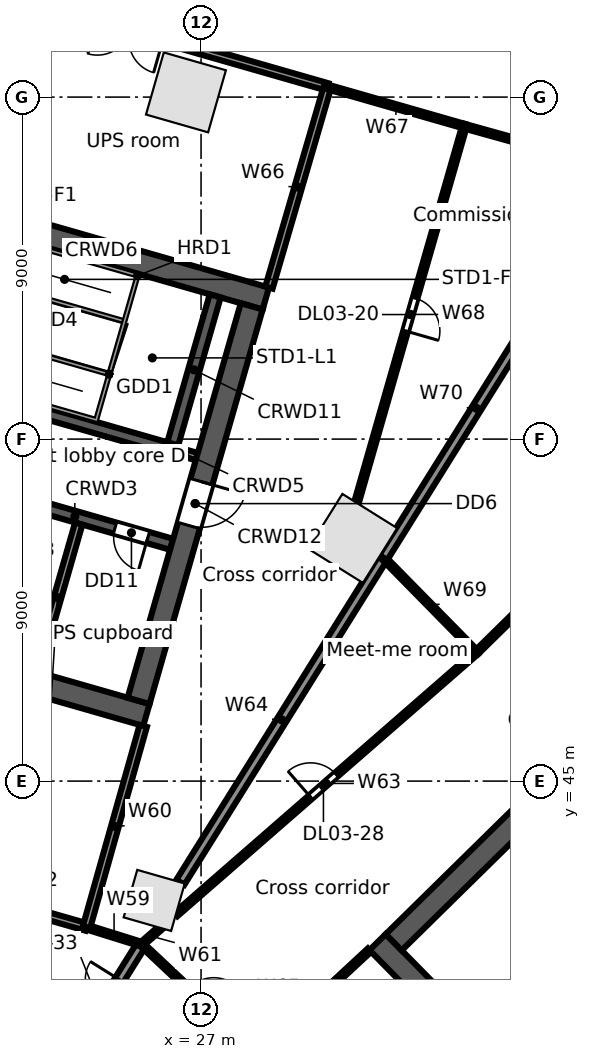
"""IFC4 building model, lengths in metres.
Left out: names, types, materials, properties, quantities, classifications, styles, units other than length and angle.
Written with IfcOpenShell. Run it as: python <this file> out.ifc"""

import sys

from ifc_helpers import new_model, si_unit, direction, frame, frame_2d, origin, origin_2d, place, context, subcontext, project, spatial, rectangle, extrude, element, fill, save


model = new_model("IFC4")
c1 = context("Model", 3, precision=1e-05, world=origin(), true_north=direction((0.0, 1.0)))
c2 = subcontext(c1, "Body", "Model", "MODEL_VIEW")
j1 = project(units=[si_unit("LENGTHUNIT", "METRE"), si_unit("PLANEANGLEUNIT", "RADIAN")], contexts=[c1])
p1 = place(None, origin())
s1 = spatial("IfcSite", under=j1, at=p1, CompositionType="ELEMENT")
p2 = place(p1, origin())
s2 = spatial("IfcBuilding", under=s1, at=p2, CompositionType="ELEMENT")
p3 = place(p2, frame((0.0, 0.0, 16.5)))
s3 = spatial("IfcBuildingStorey", under=s2, at=p3, CompositionType="ELEMENT", Elevation=16.5)
p4 = place(p3, frame((26.603, 63.124, 0.0), z_axis=(0.0, 0.0, 1.0), x_axis=(-0.961261695938, 0.275637355817, 0.0)))
e1 = element("IfcColumn", 1, at=p4, inside=s3, PredefinedType="COLUMN", context=c2, shape_type="SweptSolid", body=[
    extrude(rectangle(XDim=1.7, YDim=1.7, at=origin_2d()), origin(), (0.0, 0.0, 1.0), 5.0),
])
p5 = place(p3, frame((25.767, 41.86, 0.0), z_axis=(0.0, 0.0, 1.0), x_axis=(0.961261695938, -0.275637355817, 0.0)))
e2 = element("IfcColumn", 2, at=p5, inside=s3, PredefinedType="COLUMN", context=c2, shape_type="SweptSolid", body=[
    extrude(rectangle(XDim=1.3, YDim=1.3, at=origin_2d()), origin(), (0.0, 0.0, 1.0), 5.0),
])
p6 = place(p3, frame((30.99, 51.386, 0.0), z_axis=(0.0, 0.0, 1.0), x_axis=(0.529919264233, 0.848048096156, 0.0)))
e3 = element("IfcColumn", 3, at=p6, inside=s3, PredefinedType="COLUMN", context=c2, shape_type="SweptSolid", body=[
    extrude(rectangle(XDim=1.7, YDim=1.7, at=origin_2d()), origin(), (0.0, 0.0, 1.0), 5.0),
])
p7 = place(p3, frame((31.646, 40.763, 0.0), z_axis=(0.0, 0.0, 1.0), x_axis=(0.700911255944, -0.713248491965, 0.0)))
e4 = element("IfcWall", 4, at=p7, inside=s3, PredefinedType="SOLIDWALL", context=c2, shape_type="SweptSolid", body=[
    extrude(rectangle(XDim=15.0, YDim=0.6, at=frame_2d((7.5, 0.0))), origin(), (0.0, 0.0, 1.0), 4.65),
])
p8 = place(p7, frame((12.9, 0.0, 0.0)))
e5 = element("IfcOpeningElement", 5, at=p8, cuts=e4, PredefinedType="OPENING", context=c2, shape_type="SweptSolid", body=[
    extrude(rectangle(XDim=1.2, YDim=2.1, at=frame_2d((0.6, 1.05))), frame((0.0, 0.31, 0.0), z_axis=(0.0, -1.0, 0.0), x_axis=(1.0, 0.0, 0.0)), (0.0, 0.0, 1.0), 0.62),
])
p9 = place(p3, frame((32.07, 40.759, 0.0), z_axis=(0.0, 0.0, 1.0), x_axis=(0.713245344712, 0.70091445858, 0.0)))
e6 = element("IfcWall", 6, at=p9, inside=s3, PredefinedType="SOLIDWALL", context=c2, shape_type="SweptSolid", body=[
    extrude(rectangle(XDim=13.8, YDim=0.6, at=frame_2d((6.9, 0.0))), origin(), (0.0, 0.0, 1.0), 4.65),
])
p10 = place(p3, frame((34.593, 38.191, 0.0), z_axis=(0.0, 0.0, 1.0), x_axis=(0.713252216116, 0.700907466222, 0.0)))
e7 = element("IfcWall", 7, at=p10, inside=s3, PredefinedType="SOLIDWALL", context=c2, shape_type="SweptSolid", body=[
    extrude(rectangle(XDim=4.45, YDim=0.2, at=frame_2d((2.225, 0.0))), origin(), (0.0, 0.0, 1.0), 4.65),
])
p11 = place(p3, frame((16.911, 49.221, 0.0), z_axis=(0.0, 0.0, 1.0), x_axis=(0.96126248289, -0.275634611374, 0.0)))
e8 = element("IfcWall", 8, at=p11, inside=s3, PredefinedType="SOLIDWALL", context=c2, shape_type="SweptSolid", body=[
    extrude(rectangle(XDim=9.0, YDim=0.6, at=frame_2d((4.5, 0.0))), origin(), (0.0, 0.0, 1.0), 4.65),
])
p12 = place(p3, frame((21.131, 52.692, 0.0), z_axis=(0.0, 0.0, 1.0), x_axis=(0.961271492568, -0.275603188616, 0.0)))
e9 = element("IfcWall", 9, at=p12, inside=s3, PredefinedType="SOLIDWALL", context=c2, shape_type="SweptSolid", body=[
    extrude(rectangle(XDim=5.3, YDim=0.3, at=frame_2d((2.65, 0.0))), origin(), (0.0, 0.0, 1.0), 4.65),
])
p13 = place(p12, frame((0.95, 0.0, 0.0)))
e10 = element("IfcOpeningElement", 10, at=p13, cuts=e9, PredefinedType="OPENING", context=c2, shape_type="SweptSolid", body=[
    extrude(rectangle(XDim=0.9, YDim=2.1, at=frame_2d((0.45, 1.05))), frame((0.0, 0.16, 0.0), z_axis=(0.0, -1.0, 0.0), x_axis=(1.0, 0.0, 0.0)), (0.0, 0.0, 1.0), 0.32),
])
p14 = place(p12, frame((3.75, 0.0, 0.0)))
e11 = element("IfcOpeningElement", 11, at=p14, cuts=e9, PredefinedType="OPENING", context=c2, shape_type="SweptSolid", body=[
    extrude(rectangle(XDim=0.9, YDim=2.1, at=frame_2d((0.45, 1.05))), frame((0.0, 0.16, 0.0), z_axis=(0.0, -1.0, 0.0), x_axis=(1.0, 0.0, 0.0)), (0.0, 0.0, 1.0), 0.32),
])
p15 = place(p3, frame((19.389, 55.689, 0.0), z_axis=(0.0, 0.0, 1.0), x_axis=(0.961261397636, -0.275638396117, 0.0)))
e12 = element("IfcWall", 12, at=p15, inside=s3, PredefinedType="SOLIDWALL", context=c2, shape_type="SweptSolid", body=[
    extrude(rectangle(XDim=7.1, YDim=0.3, at=frame_2d((3.55, 0.0))), origin(), (0.0, 0.0, 1.0), 4.65),
])
p16 = place(p15, frame((0.2, 0.0, 0.0)))
e13 = element("IfcOpeningElement", 13, at=p16, cuts=e12, PredefinedType="OPENING", context=c2, shape_type="SweptSolid", body=[
    extrude(rectangle(XDim=1.0, YDim=2.1, at=frame_2d((0.5, 1.05))), frame((0.0, 0.16, 0.0), z_axis=(0.0, -1.0, 0.0), x_axis=(1.0, 0.0, 0.0)), (0.0, 0.0, 1.0), 0.32),
])
p17 = place(p3, frame((26.214, 53.732, 0.0), z_axis=(0.0, 0.0, 1.0), x_axis=(0.96122076476, -0.27578005982, 0.0)))
e14 = element("IfcWall", 14, at=p17, inside=s3, PredefinedType="SOLIDWALL", context=c2, shape_type="SweptSolid", body=[
    extrude(rectangle(XDim=0.7, YDim=0.2, at=frame_2d((0.35, 0.0))), origin(), (0.0, 0.0, 1.0), 4.65),
])
p18 = place(p3, frame((20.053, 60.18, 0.0), z_axis=(0.0, 0.0, 1.0), x_axis=(0.96126248289, -0.275634611374, 0.0)))
e15 = element("IfcWall", 15, at=p18, inside=s3, PredefinedType="SOLIDWALL", context=c2, shape_type="SweptSolid", body=[
    extrude(rectangle(XDim=9.0, YDim=0.6, at=frame_2d((4.5, 0.0))), origin(), (0.0, 0.0, 1.0), 4.65),
])
p19 = place(p3, frame((22.665, 47.883, 0.0), z_axis=(0.0, 0.0, 1.0), x_axis=(0.275596769212, 0.961273333033, 0.0)))
e16 = element("IfcWall", 16, at=p19, inside=s3, PredefinedType="PARTITIONING", context=c2, shape_type="SweptSolid", body=[
    extrude(rectangle(XDim=4.05, YDim=0.2, at=frame_2d((2.025, 0.0))), origin(), (0.0, 0.0, 1.0), 4.65),
])
p20 = place(p3, frame((26.256, 53.876, 0.0), z_axis=(0.0, 0.0, 1.0), x_axis=(0.275612739511, 0.961268754209, 0.0)))
e17 = element("IfcWall", 17, at=p20, inside=s3, PredefinedType="SOLIDWALL", context=c2, shape_type="SweptSolid", body=[
    extrude(rectangle(XDim=4.05, YDim=0.3, at=frame_2d((2.025, 0.0))), origin(), (0.0, 0.0, 1.0), 4.65),
])
p21 = place(p3, frame((25.356, 47.112, 0.0), z_axis=(0.0, 0.0, 1.0), x_axis=(0.275631631629, 0.961263337304, 0.0)))
e18 = element("IfcWall", 18, at=p21, inside=s3, PredefinedType="SOLIDWALL", context=c2, shape_type="SweptSolid", body=[
    extrude(rectangle(XDim=10.8, YDim=0.6, at=frame_2d((5.4, 0.0))), origin(), (0.0, 0.0, 1.0), 4.65),
])
p22 = place(p21, frame((4.8, 0.0, 0.0)))
e19 = element("IfcOpeningElement", 19, at=p22, cuts=e18, PredefinedType="OPENING", context=c2, shape_type="SweptSolid", body=[
    extrude(rectangle(XDim=1.2, YDim=2.1, at=frame_2d((0.6, 1.05))), frame((0.0, 0.31, 0.0), z_axis=(0.0, -1.0, 0.0), x_axis=(1.0, 0.0, 0.0)), (0.0, 0.0, 1.0), 0.62),
])
p23 = place(p3, frame((15.335, 43.639, 0.0), z_axis=(0.0, 0.0, 1.0), x_axis=(0.961281982754, -0.275566597455, 0.0)))
e20 = element("IfcWall", 20, at=p23, inside=s3, PredefinedType="PARTITIONING", context=c2, shape_type="SweptSolid", body=[
    extrude(rectangle(XDim=9.0, YDim=0.2, at=frame_2d((4.5, 0.0))), origin(), (0.0, 0.0, 1.0), 3.822),
])
p24 = place(p23, frame((3.7, 0.0, 0.0)))
e21 = element("IfcOpeningElement", 21, at=p24, cuts=e20, PredefinedType="OPENING", context=c2, shape_type="SweptSolid", body=[
    extrude(rectangle(XDim=1.8, YDim=2.1, at=frame_2d((0.9, 1.05))), frame((0.0, 0.11, 0.0), z_axis=(0.0, -1.0, 0.0), x_axis=(1.0, 0.0, 0.0)), (0.0, 0.0, 1.0), 0.22),
])
p25 = place(p3, frame((21.674, 65.749, 0.0), z_axis=(0.0, 0.0, 1.0), x_axis=(0.961259417468, -0.275645301662, 0.0)))
e22 = element("IfcWall", 22, at=p25, inside=s3, PredefinedType="PARTITIONING", context=c2, shape_type="SweptSolid", body=[
    extrude(rectangle(XDim=9.0, YDim=0.2, at=frame_2d((4.5, 0.0))), origin(), (0.0, 0.0, 1.0), 3.822),
])
p26 = place(p25, frame((2.7, 0.0, 0.0)))
e23 = element("IfcOpeningElement", 23, at=p26, cuts=e22, PredefinedType="OPENING", context=c2, shape_type="SweptSolid", body=[
    extrude(rectangle(XDim=1.8, YDim=2.1, at=frame_2d((0.9, 1.05))), frame((0.0, 0.11, 0.0), z_axis=(0.0, -1.0, 0.0), x_axis=(1.0, 0.0, 0.0)), (0.0, 0.0, 1.0), 0.22),
])
p27 = place(p3, frame((23.397, 37.442, 0.0), z_axis=(0.0, 0.0, 1.0), x_axis=(0.529805058875, 0.848119448893, 0.0)))
e24 = element("IfcWall", 24, at=p27, inside=s3, PredefinedType="PARTITIONING", context=c2, shape_type="SweptSolid", body=[
    extrude(rectangle(XDim=3.849, YDim=0.25, at=frame_2d((1.924, 0.0))), origin(), (0.0, 0.0, 1.0), 3.712),
])
p28 = place(p27, frame((0.95, 0.0, 0.0)))
e25 = element("IfcOpeningElement", 25, at=p28, cuts=e24, PredefinedType="OPENING", context=c2, shape_type="SweptSolid", body=[
    extrude(rectangle(XDim=1.8, YDim=2.1, at=frame_2d((0.9, 1.05))), frame((0.0, 0.135, 0.0), z_axis=(0.0, -1.0, 0.0), x_axis=(1.0, 0.0, 0.0)), (0.0, 0.0, 1.0), 0.27),
])
p29 = place(p3, frame((23.986, 41.159, 0.0), z_axis=(0.0, 0.0, 1.0), x_axis=(0.954522865266, -0.298137719325, 0.0)))
e26 = element("IfcWall", 26, at=p29, inside=s3, PredefinedType="PARTITIONING", context=c2, shape_type="SweptSolid", body=[
    extrude(rectangle(XDim=1.519, YDim=0.125, at=frame_2d((0.76, 0.0))), origin(), (0.0, 0.0, 1.0), 3.712),
])
p30 = place(p3, frame((23.986, 41.159, 0.0), z_axis=(0.0, 0.0, 1.0), x_axis=(0.271465437068, 0.962448188983, 0.0)))
e27 = element("IfcWall", 27, at=p30, inside=s3, PredefinedType="PARTITIONING", context=c2, shape_type="SweptSolid", body=[
    extrude(rectangle(XDim=5.5, YDim=0.2, at=frame_2d((2.75, 0.0))), origin(), (0.0, 0.0, 1.0), 3.93),
])
p31 = place(p3, frame((25.436, 40.706, 0.0), z_axis=(0.0, 0.0, 1.0), x_axis=(0.753521944961, 0.657422754749, 0.0)))
e28 = element("IfcWall", 28, at=p31, inside=s3, PredefinedType="PARTITIONING", context=c2, shape_type="SweptSolid", body=[
    extrude(rectangle(XDim=0.656, YDim=0.125, at=frame_2d((0.328, 0.0))), origin(), (0.0, 0.0, 1.0), 4.65),
])
p32 = place(p3, frame((25.436, 40.706, 0.0), z_axis=(0.0, 0.0, 1.0), x_axis=(0.729011488135, -0.684501461041, 0.0)))
e29 = element("IfcWall", 29, at=p32, inside=s3, PredefinedType="PARTITIONING", context=c2, shape_type="SweptSolid", body=[
    extrude(rectangle(XDim=4.202, YDim=0.125, at=frame_2d((2.101, 0.0))), origin(), (0.0, 0.0, 1.0), 4.65),
])
p33 = place(p32, frame((1.7, 0.0, 0.0)))
e30 = element("IfcOpeningElement", 30, at=p33, cuts=e29, PredefinedType="OPENING", context=c2, shape_type="SweptSolid", body=[
    extrude(rectangle(XDim=0.9, YDim=2.1, at=frame_2d((0.45, 1.05))), frame((0.0, 0.073, 0.0), z_axis=(0.0, -1.0, 0.0), x_axis=(1.0, 0.0, 0.0)), (0.0, 0.0, 1.0), 0.145),
])
p34 = place(p3, frame((26.338, 41.492, 0.0), z_axis=(0.0, 0.0, 1.0), x_axis=(0.753866696092, 0.657027400131, 0.0)))
e31 = element("IfcWall", 31, at=p34, inside=s3, PredefinedType="PARTITIONING", context=c2, shape_type="SweptSolid", body=[
    extrude(rectangle(XDim=10.493, YDim=0.125, at=frame_2d((5.246, 0.0))), origin(), (0.0, 0.0, 1.0), 3.73),
])
p35 = place(p34, frame((4.7, 0.0, 0.0)))
e32 = element("IfcOpeningElement", 32, at=p35, cuts=e31, PredefinedType="OPENING", context=c2, shape_type="SweptSolid", body=[
    extrude(rectangle(XDim=0.9, YDim=2.1, at=frame_2d((0.45, 1.05))), frame((0.0, 0.073, 0.0), z_axis=(0.0, -1.0, 0.0), x_axis=(1.0, 0.0, 0.0)), (0.0, 0.0, 1.0), 0.145),
])
p36 = place(p3, frame((26.456, 42.338, 0.0), z_axis=(0.0, 0.0, 1.0), x_axis=(0.529866075757, 0.848081329686, 0.0)))
e33 = element("IfcWall", 33, at=p36, inside=s3, PredefinedType="PARTITIONING", context=c2, shape_type="SweptSolid", body=[
    extrude(rectangle(XDim=10.076, YDim=0.25, at=frame_2d((5.038, 0.0))), origin(), (0.0, 0.0, 1.0), 3.712),
])
p37 = place(p3, frame((28.499, 37.83, 0.0), z_axis=(0.0, 0.0, 1.0), x_axis=(0.732973836409, 0.680256830278, 0.0)))
e34 = element("IfcWall", 34, at=p37, inside=s3, PredefinedType="PARTITIONING", context=c2, shape_type="SweptSolid", body=[
    extrude(rectangle(XDim=4.001, YDim=0.125, at=frame_2d((2.0, 0.0))), origin(), (0.0, 0.0, 1.0), 3.93),
])
p38 = place(p3, frame((28.787, 57.987, 0.0), z_axis=(0.0, 0.0, 1.0), x_axis=(0.279752860161, 0.960072047938, 0.0)))
e35 = element("IfcWall", 35, at=p38, inside=s3, PredefinedType="PARTITIONING", context=c2, shape_type="SweptSolid", body=[
    extrude(rectangle(XDim=5.501, YDim=0.2, at=frame_2d((2.75, 0.0))), origin(), (0.0, 0.0, 1.0), 3.922),
])
p39 = place(p3, frame((30.326, 63.268, 0.0), z_axis=(0.0, 0.0, 1.0), x_axis=(0.96120880595, -0.275821738383, 0.0)))
e36 = element("IfcWall", 36, at=p39, inside=s3, PredefinedType="PARTITIONING", context=c2, shape_type="SweptSolid", body=[
    extrude(rectangle(XDim=3.75, YDim=0.125, at=frame_2d((1.875, 0.0))), origin(), (0.0, 0.0, 1.0), 4.65),
])
p40 = place(p3, frame((31.089, 52.327, 0.0), z_axis=(0.0, 0.0, 1.0), x_axis=(0.275640835953, 0.961260698019, 0.0)))
e37 = element("IfcWall", 37, at=p40, inside=s3, PredefinedType="PARTITIONING", context=c2, shape_type="SweptSolid", body=[
    extrude(rectangle(XDim=10.306, YDim=0.125, at=frame_2d((5.153, 0.0))), origin(), (0.0, 0.0, 1.0), 3.922),
])
p41 = place(p40, frame((4.7, 0.0, 0.0)))
e38 = element("IfcOpeningElement", 38, at=p41, cuts=e37, PredefinedType="OPENING", context=c2, shape_type="SweptSolid", body=[
    extrude(rectangle(XDim=0.9, YDim=2.1, at=frame_2d((0.45, 1.05))), frame((0.0, 0.073, 0.0), z_axis=(0.0, -1.0, 0.0), x_axis=(1.0, 0.0, 0.0)), (0.0, 0.0, 1.0), 0.145),
])
p42 = place(p3, frame((31.795, 50.883, 0.0), z_axis=(0.0, 0.0, 1.0), x_axis=(0.700801832867, -0.713356005828, 0.0)))
e39 = element("IfcWall", 39, at=p42, inside=s3, PredefinedType="PARTITIONING", context=c2, shape_type="SweptSolid", body=[
    extrude(rectangle(XDim=3.5, YDim=0.125, at=frame_2d((1.75, 0.0))), origin(), (0.0, 0.0, 1.0), 3.73),
])
p43 = place(p3, frame((31.795, 50.883, 0.0), z_axis=(0.0, 0.0, 1.0), x_axis=(0.529939676421, 0.848035340864, 0.0)))
e40 = element("IfcWall", 40, at=p43, inside=s3, PredefinedType="PARTITIONING", context=c2, shape_type="SweptSolid", body=[
    extrude(rectangle(XDim=9.258, YDim=0.25, at=frame_2d((4.629, 0.0))), origin(), (0.0, 0.0, 1.0), 3.73),
])
p44 = place(p3, frame((33.93, 62.234, 0.0), z_axis=(0.0, 0.0, 1.0), x_axis=(0.963433299433, -0.267948274007, 0.0)))
e41 = element("IfcWall", 41, at=p44, inside=s3, PredefinedType="PARTITIONING", context=c2, shape_type="SweptSolid", body=[
    extrude(rectangle(XDim=4.385, YDim=0.125, at=frame_2d((2.192, 0.0))), origin(), (0.0, 0.0, 1.0), 4.018),
])
p45 = place(p3, frame((34.248, 48.386, 0.0), z_axis=(0.0, 0.0, 1.0), x_axis=(0.713246685355, 0.700913094349, 0.0)))
e42 = element("IfcWall", 42, at=p45, inside=s3, PredefinedType="PARTITIONING", context=c2, shape_type="SweptSolid", body=[
    extrude(rectangle(XDim=11.501, YDim=0.125, at=frame_2d((5.75, 0.0))), origin(), (0.0, 0.0, 1.0), 3.83),
])
p46 = place(p45, frame((5.2, 0.0, 0.0)))
e43 = element("IfcOpeningElement", 43, at=p46, cuts=e42, PredefinedType="OPENING", context=c2, shape_type="SweptSolid", body=[
    extrude(rectangle(XDim=0.9, YDim=2.1, at=frame_2d((0.45, 1.05))), frame((0.0, 0.073, 0.0), z_axis=(0.0, -1.0, 0.0), x_axis=(1.0, 0.0, 0.0)), (0.0, 0.0, 1.0), 0.145),
])
p47 = place(p22, frame((1.2, 0.0, 0.0), z_axis=(0.0, 0.0, 1.0), x_axis=(-1.0, 0.0, 0.0)))
e44 = element("IfcDoor", 44, at=p47, inside=s3, OperationType="SINGLE_SWING_LEFT", PredefinedType="DOOR", context=c2, shape_type="SweptSolid", body=[
    extrude(rectangle(XDim=1.2, YDim=2.1, at=frame_2d((0.6, 1.05))), frame((0.0, 0.025, 0.0), z_axis=(0.0, -1.0, 0.0), x_axis=(1.0, 0.0, 0.0)), (0.0, 0.0, 1.0), 0.05),
])
fill(e19, e44)
p48 = place(p14, frame((0.9, 0.0, 0.0), z_axis=(0.0, 0.0, 1.0), x_axis=(-1.0, 0.0, 0.0)))
e45 = element("IfcDoor", 45, at=p48, inside=s3, OperationType="SINGLE_SWING_LEFT", PredefinedType="DOOR", context=c2, shape_type="SweptSolid", body=[
    extrude(rectangle(XDim=0.9, YDim=2.1, at=frame_2d((0.45, 1.05))), frame((0.0, 0.025, 0.0), z_axis=(0.0, -1.0, 0.0), x_axis=(1.0, 0.0, 0.0)), (0.0, 0.0, 1.0), 0.05),
])
fill(e11, e45)
p49 = place(p41, frame((0.9, 0.0, 0.0), z_axis=(0.0, 0.0, 1.0), x_axis=(-1.0, 0.0, 0.0)))
e46 = element("IfcDoor", 46, at=p49, inside=s3, OperationType="SINGLE_SWING_RIGHT", PredefinedType="DOOR", context=c2, shape_type="SweptSolid", body=[
    extrude(rectangle(XDim=0.9, YDim=2.1, at=frame_2d((0.45, 1.05))), frame((0.0, 0.025, 0.0), z_axis=(0.0, -1.0, 0.0), x_axis=(1.0, 0.0, 0.0)), (0.0, 0.0, 1.0), 0.05),
])
fill(e38, e46)
p50 = place(p35, origin())
e47 = element("IfcDoor", 47, at=p50, inside=s3, OperationType="SINGLE_SWING_LEFT", PredefinedType="DOOR", context=c2, shape_type="SweptSolid", body=[
    extrude(rectangle(XDim=0.9, YDim=2.1, at=frame_2d((0.45, 1.05))), frame((0.0, 0.025, 0.0), z_axis=(0.0, -1.0, 0.0), x_axis=(1.0, 0.0, 0.0)), (0.0, 0.0, 1.0), 0.05),
])
fill(e32, e47)
p51 = place(p28, origin())
e48 = element("IfcDoor", 48, at=p51, inside=s3, OperationType="DOUBLE_DOOR_SINGLE_SWING", PredefinedType="DOOR", context=c2, shape_type="SweptSolid", body=[
    extrude(rectangle(XDim=1.8, YDim=2.1, at=frame_2d((0.9, 1.05))), frame((0.0, 0.025, 0.0), z_axis=(0.0, -1.0, 0.0), x_axis=(1.0, 0.0, 0.0)), (0.0, 0.0, 1.0), 0.05),
])
fill(e25, e48)
save(model, sys.argv[1])
